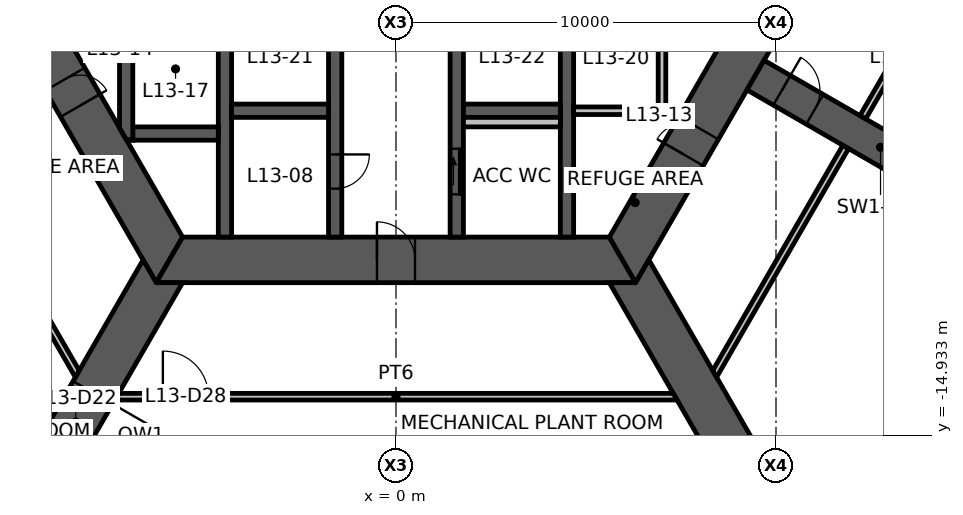
"""IFC4 building model, lengths in metres.
Left out: names, types, materials, properties, quantities, classifications, styles, units other than length and angle.
Written with IfcOpenShell. Run it as: python <this file> out.ifc"""

import sys

from ifc_helpers import new_model, si_unit, direction, frame, frame_2d, origin, place, context, subcontext, project, spatial, polyline, rectangle, outline, extrude, element, fill, save


model = new_model("IFC4")
c1 = context("Model", 3, precision=1e-05, world=origin(), true_north=direction((0.0, 1.0)))
c2 = subcontext(c1, "Body", "Model", "MODEL_VIEW")
j1 = project(units=[si_unit("LENGTHUNIT", "METRE"), si_unit("PLANEANGLEUNIT", "RADIAN")], contexts=[c1])
p1 = place(None, origin())
s1 = spatial("IfcSite", under=j1, at=p1, CompositionType="ELEMENT")
p2 = place(p1, origin())
s2 = spatial("IfcBuilding", under=s1, at=p2, CompositionType="ELEMENT")
p3 = place(p2, frame((0.0, 0.0, 52.0)))
s3 = spatial("IfcBuildingStorey", under=s2, at=p3, CompositionType="ELEMENT", Elevation=52.0)
p4 = place(p3, frame((-11.922, 0.0, 0.0), z_axis=(0.0, 0.0, 1.0), x_axis=(0.500004296715, -0.866022923061, 0.0)))
e1 = element("IfcWall", 1, at=p4, inside=s3, PredefinedType="SHEAR", context=c2, shape_type="SweptSolid", body=[
    extrude(outline(polyline([(-0.346, -0.6), (6.431, -0.6), (7.231, -0.6), (12.269, -0.6), (11.576, 0.6), (7.231, 0.6), (6.431, 0.6), (0.346, 0.6), (-0.346, -0.6)])), origin(), (0.0, 0.0, 1.0), 5.0),
])
p5 = place(p4, frame((6.431, 0.0, 0.0)))
e2 = element("IfcOpeningElement", 2, at=p5, cuts=e1, PredefinedType="OPENING", context=c2, shape_type="SweptSolid", body=[
    extrude(rectangle(XDim=0.8, YDim=2.1, at=frame_2d((0.4, 1.05))), frame((0.0, 0.61, 0.0), z_axis=(0.0, -1.0, 0.0), x_axis=(1.0, 0.0, 0.0)), (0.0, 0.0, 1.0), 1.22),
])
p6 = place(p3, frame((-5.961, -10.325, 0.0), z_axis=(0.0, 0.0, 1.0), x_axis=(1.0, 0.0, 0.0)))
e3 = element("IfcWall", 3, at=p6, inside=s3, PredefinedType="SHEAR", context=c2, shape_type="SweptSolid", body=[
    extrude(outline(polyline([(-0.346, -0.6), (5.461, -0.6), (6.461, -0.6), (12.269, -0.6), (11.576, 0.6), (6.461, 0.6), (5.461, 0.6), (0.346, 0.6), (-0.346, -0.6)])), origin(), (0.0, 0.0, 1.0), 5.0),
])
p7 = place(p6, frame((5.461, 0.0, 0.0)))
e4 = element("IfcOpeningElement", 4, at=p7, cuts=e3, PredefinedType="OPENING", context=c2, shape_type="SweptSolid", body=[
    extrude(rectangle(XDim=1.0, YDim=2.1, at=frame_2d((0.5, 1.05))), frame((0.0, 0.61, 0.0), z_axis=(0.0, -1.0, 0.0), x_axis=(1.0, 0.0, 0.0)), (0.0, 0.0, 1.0), 1.22),
])
p8 = place(p3, frame((5.961, -10.325, 0.0), z_axis=(0.0, 0.0, 1.0), x_axis=(0.500004296715, 0.866022923061, 0.0)))
e5 = element("IfcWall", 5, at=p8, inside=s3, PredefinedType="SHEAR", context=c2, shape_type="SweptSolid", body=[
    extrude(outline(polyline([(-0.346, -0.6), (3.208, -0.6), (4.009, -0.6), (12.269, -0.6), (11.576, 0.6), (4.009, 0.6), (3.208, 0.6), (0.346, 0.6), (-0.346, -0.6)])), origin(), (0.0, 0.0, 1.0), 5.0),
])
p9 = place(p8, frame((3.208, 0.0, 0.0)))
e6 = element("IfcOpeningElement", 6, at=p9, cuts=e5, PredefinedType="OPENING", context=c2, shape_type="SweptSolid", body=[
    extrude(rectangle(XDim=0.8, YDim=2.1, at=frame_2d((0.4, 1.05))), frame((0.0, 0.61, 0.0), z_axis=(0.0, -1.0, 0.0), x_axis=(1.0, 0.0, 0.0)), (0.0, 0.0, 1.0), 1.22),
])
p10 = place(p3, frame((9.461, -5.462, 0.0), z_axis=(0.0, 0.0, 1.0), x_axis=(0.866019116917, -0.500010889016, 0.0)))
e7 = element("IfcWall", 7, at=p10, inside=s3, PredefinedType="SHEAR", context=c2, shape_type="SweptSolid", body=[
    extrude(rectangle(XDim=7.595, YDim=0.9, at=frame_2d((3.798, 0.0))), origin(), (0.0, 0.0, 1.0), 5.0),
])
p11 = place(p10, frame((0.8, 0.0, 0.0)))
e8 = element("IfcOpeningElement", 8, at=p11, cuts=e7, PredefinedType="OPENING", context=c2, shape_type="SweptSolid", body=[
    extrude(rectangle(XDim=1.0, YDim=2.1, at=frame_2d((0.5, 1.05))), frame((0.0, 0.46, 0.0), z_axis=(0.0, -1.0, 0.0), x_axis=(1.0, 0.0, 0.0)), (0.0, 0.0, 1.0), 0.92),
])
p12 = place(p3, frame((-6.308, -10.925, -1.15), z_axis=(0.0, 0.0, 1.0), x_axis=(-0.499993363642, -0.866029235253, 0.0)))
e9 = element("IfcWall", 9, at=p12, inside=s3, PredefinedType="SHEAR", context=c2, shape_type="SweptSolid", body=[
    extrude(outline(polyline([(-0.346, -0.6), (3.338, -0.6), (5.138, -0.6), (7.385, -0.6), (7.385, 0.6), (5.138, 0.6), (3.338, 0.6), (-0.346, 0.6), (0.0, 0.0), (-0.346, -0.6)])), origin(), (0.0, 0.0, 1.0), 6.15),
])
p13 = place(p12, frame((3.338, 0.0, 1.15)))
e10 = element("IfcOpeningElement", 10, at=p13, cuts=e9, PredefinedType="OPENING", context=c2, shape_type="SweptSolid", body=[
    extrude(rectangle(XDim=1.8, YDim=2.4, at=frame_2d((0.9, 1.2))), frame((0.0, 0.61, 0.0), z_axis=(0.0, -1.0, 0.0), x_axis=(1.0, 0.0, 0.0)), (0.0, 0.0, 1.0), 1.22),
])
p14 = place(p3, frame((6.308, -10.925, -1.15), z_axis=(0.0, 0.0, 1.0), x_axis=(0.499993363642, -0.866029235253, 0.0)))
e11 = element("IfcWall", 11, at=p14, inside=s3, PredefinedType="SHEAR", context=c2, shape_type="SweptSolid", body=[
    extrude(outline(polyline([(-0.346, -0.6), (7.385, -0.6), (7.385, 0.6), (-0.346, 0.6), (0.0, 0.0), (-0.346, -0.6)])), origin(), (0.0, 0.0, 1.0), 6.15),
])
p15 = place(p3, frame((-1.6, -3.775, 0.0), z_axis=(0.0, 0.0, 1.0), x_axis=(0.0, -1.0, 0.0)))
e12 = element("IfcWall", 12, at=p15, inside=s3, PredefinedType="SHEAR", context=c2, shape_type="SweptSolid", body=[
    extrude(rectangle(XDim=5.95, YDim=0.35, at=frame_2d((2.975, 0.0))), origin(), (0.0, 0.0, 1.0), 5.0),
])
p16 = place(p15, frame((3.775, 0.0, 0.0)))
e13 = element("IfcOpeningElement", 13, at=p16, cuts=e12, PredefinedType="OPENING", context=c2, shape_type="SweptSolid", body=[
    extrude(rectangle(XDim=0.9, YDim=2.1, at=frame_2d((0.45, 1.05))), frame((0.0, 0.185, 0.0), z_axis=(0.0, -1.0, 0.0), x_axis=(1.0, 0.0, 0.0)), (0.0, 0.0, 1.0), 0.37),
])
p17 = place(p3, frame((1.6, -3.775, 0.0), z_axis=(0.0, 0.0, 1.0), x_axis=(0.0, -1.0, 0.0)))
e14 = element("IfcWall", 14, at=p17, inside=s3, PredefinedType="SHEAR", context=c2, shape_type="SweptSolid", body=[
    extrude(rectangle(XDim=5.95, YDim=0.35, at=frame_2d((2.975, 0.0))), origin(), (0.0, 0.0, 1.0), 5.0),
])
p18 = place(p17, frame((3.625, 0.0, 0.0)))
e15 = element("IfcOpeningElement", 15, at=p18, cuts=e14, PredefinedType="OPENING", context=c2, shape_type="SweptSolid", body=[
    extrude(rectangle(XDim=1.2, YDim=2.1, at=frame_2d((0.6, 1.05))), frame((0.0, 0.185, 0.0), z_axis=(0.0, -1.0, 0.0), x_axis=(1.0, 0.0, 0.0)), (0.0, 0.0, 1.0), 0.37),
])
for number, where, z_axis, x_axis in (
    (16, (-4.5, -3.775, 0.0), (0.0, 0.0, 1.0), (0.0, -1.0, 0.0)),
    (17, (4.5, -3.775, 0.0), (0.0, 0.0, 1.0), (0.0, -1.0, 0.0)),
):
    element("IfcWall", number, at=place(p3, frame(where, z_axis=z_axis, x_axis=x_axis)), inside=s3, PredefinedType="SHEAR", context=c2, shape_type="SweptSolid", body=[
        extrude(rectangle(XDim=5.95, YDim=0.35, at=frame_2d((2.975, 0.0))), origin(), (0.0, 0.0, 1.0), 5.0),
    ])
for number, where, z_axis, x_axis in (
    (18, (-4.325, -6.4, 0.0), (0.0, 0.0, 1.0), (1.0, 0.0, 0.0)),
    (19, (1.775, -6.4, 0.0), (0.0, 0.0, 1.0), (1.0, 0.0, 0.0)),
):
    element("IfcWall", number, at=place(p3, frame(where, z_axis=z_axis, x_axis=x_axis)), inside=s3, PredefinedType="SHEAR", context=c2, shape_type="SweptSolid", body=[
        extrude(rectangle(XDim=2.55, YDim=0.35, at=frame_2d((1.275, 0.0))), origin(), (0.0, 0.0, 1.0), 5.0),
    ])
p19 = place(p3, frame((-6.925, -7.0, 0.0), z_axis=(0.0, 0.0, 1.0), x_axis=(1.0, 0.0, 0.0)))
e20 = element("IfcWall", 20, at=p19, inside=s3, PredefinedType="SHEAR", context=c2, shape_type="SweptSolid", body=[
    extrude(rectangle(XDim=2.25, YDim=0.35, at=frame_2d((1.125, 0.0))), origin(), (0.0, 0.0, 1.0), 5.0),
])
p20 = place(p3, frame((-7.1, -3.775, 0.0), z_axis=(0.0, 0.0, 1.0), x_axis=(0.0, -1.0, 0.0)))
e21 = element("IfcWall", 21, at=p20, inside=s3, PredefinedType="SHEAR", context=c2, shape_type="SweptSolid", body=[
    extrude(outline(polyline([(0.0, -0.175), (3.074, -0.175), (3.377, 0.0), (3.4, 0.175), (0.0, 0.175), (0.0, -0.175)])), origin(), (0.0, 0.0, 1.0), 5.0),
])
p21 = place(p3, frame((4.675, -6.4, 0.0), z_axis=(0.0, 0.0, 1.0), x_axis=(1.0, 0.0, 0.0)))
e22 = element("IfcWall", 22, at=p21, inside=s3, PredefinedType="STANDARD", context=c2, shape_type="SweptSolid", body=[
    extrude(rectangle(XDim=2.425, YDim=0.2, at=frame_2d((1.212, 0.0))), origin(), (0.0, 0.0, 1.0), 5.0),
])
p22 = place(p3, frame((7.0, -3.775, 0.0), z_axis=(0.0, 0.0, 1.0), x_axis=(0.0, -1.0, 0.0)))
e23 = element("IfcWall", 23, at=p22, inside=s3, PredefinedType="STANDARD", context=c2, shape_type="SweptSolid", body=[
    extrude(rectangle(XDim=2.525, YDim=0.2, at=frame_2d((1.263, 0.0))), origin(), (0.0, 0.0, 1.0), 5.0),
])
p23 = place(p3, frame((1.775, -6.7, 0.0), z_axis=(0.0, 0.0, 1.0), x_axis=(1.0, 0.0, 0.0)))
e24 = element("IfcWall", 24, at=p23, inside=s3, PredefinedType="PLUMBINGWALL", context=c2, shape_type="SweptSolid", body=[
    extrude(rectangle(XDim=2.55, YDim=0.25, at=frame_2d((1.275, 0.0))), origin(), (0.0, 0.0, 1.0), 5.0),
])
p24 = place(p3, frame((-11.832, -7.356, 0.0), z_axis=(0.0, 0.0, 1.0), x_axis=(0.49998719302, -0.866032797772, 0.0)))
e25 = element("IfcWall", 25, at=p24, inside=s3, PredefinedType="PARTITIONING", context=c2, shape_type="SweptSolid", body=[
    extrude(outline(polyline([(0.0, -0.087), (1.9, -0.087), (3.1, -0.087), (6.942, -0.087), (6.841, 0.087), (3.1, 0.087), (1.9, 0.087), (0.0, 0.087), (0.0, -0.087)])), origin(), (0.0, 0.0, 1.0), 4.83),
])
p25 = place(p24, frame((1.9, 0.0, 0.0)))
e26 = element("IfcOpeningElement", 26, at=p25, cuts=e25, PredefinedType="OPENING", context=c2, shape_type="SweptSolid", body=[
    extrude(rectangle(XDim=1.2, YDim=2.1, at=frame_2d((0.6, 1.05))), frame((0.0, 0.098, 0.0), z_axis=(0.0, -1.0, 0.0), x_axis=(1.0, 0.0, 0.0)), (0.0, 0.0, 1.0), 0.195),
])
p26 = place(p3, frame((12.287, -6.569, 0.0), z_axis=(0.0, 0.0, 1.0), x_axis=(0.49998719302, 0.866032797772, 0.0)))
e27 = element("IfcWall", 27, at=p26, inside=s3, PredefinedType="PARTITIONING", context=c2, shape_type="SweptSolid", body=[
    extrude(outline(polyline([(0.0, -0.087), (1.9, -0.087), (3.1, -0.087), (6.942, -0.087), (6.841, 0.087), (3.1, 0.087), (1.9, 0.087), (0.0, 0.087), (0.0, -0.087)])), origin(), (0.0, 0.0, 1.0), 4.83),
])
p27 = place(p26, frame((1.9, 0.0, 0.0)))
e28 = element("IfcOpeningElement", 28, at=p27, cuts=e27, PredefinedType="OPENING", context=c2, shape_type="SweptSolid", body=[
    extrude(rectangle(XDim=1.2, YDim=2.1, at=frame_2d((0.6, 1.05))), frame((0.0, 0.098, 0.0), z_axis=(0.0, -1.0, 0.0), x_axis=(1.0, 0.0, 0.0)), (0.0, 0.0, 1.0), 0.195),
])
p28 = place(p3, frame((-7.347, -13.925, 0.0), z_axis=(0.0, 0.0, 1.0), x_axis=(1.0, 0.0, 0.0)))
e29 = element("IfcWall", 29, at=p28, inside=s3, PredefinedType="PARTITIONING", context=c2, shape_type="SweptSolid", body=[
    extrude(outline(polyline([(-0.051, -0.087), (1.213, -0.087), (2.413, -0.087), (14.744, -0.087), (14.643, 0.087), (2.413, 0.087), (1.213, 0.087), (0.051, 0.087), (-0.051, -0.087)])), origin(), (0.0, 0.0, 1.0), 4.83),
])
p29 = place(p28, frame((1.213, 0.0, 0.0)))
e30 = element("IfcOpeningElement", 30, at=p29, cuts=e29, PredefinedType="OPENING", context=c2, shape_type="SweptSolid", body=[
    extrude(rectangle(XDim=1.2, YDim=2.1, at=frame_2d((0.6, 1.05))), frame((0.0, 0.098, 0.0), z_axis=(0.0, -1.0, 0.0), x_axis=(1.0, 0.0, 0.0)), (0.0, 0.0, 1.0), 0.195),
])
p30 = place(p3, frame((8.386, -13.325, 0.0), z_axis=(0.0, 0.0, 1.0), x_axis=(0.49998719302, 0.866032797772, 0.0)))
e31 = element("IfcWall", 31, at=p30, inside=s3, PredefinedType="PARTITIONING", context=c2, shape_type="SweptSolid", body=[
    extrude(outline(polyline([(-0.051, -0.087), (6.892, -0.087), (6.892, 0.087), (0.051, 0.087), (-0.051, -0.087)])), origin(), (0.0, 0.0, 1.0), 4.83),
])
p31 = place(p7, origin())
e32 = element("IfcDoor", 32, at=p31, inside=s3, OperationType="SINGLE_SWING_LEFT", PredefinedType="DOOR", context=c2, shape_type="SweptSolid", body=[
    extrude(rectangle(XDim=1.0, YDim=2.1, at=frame_2d((0.5, 1.05))), frame((0.0, 0.025, 0.0), z_axis=(0.0, -1.0, 0.0), x_axis=(1.0, 0.0, 0.0)), (0.0, 0.0, 1.0), 0.05),
])
fill(e4, e32)
p32 = place(p9, origin())
e33 = element("IfcDoor", 33, at=p32, inside=s3, OperationType="SINGLE_SWING_LEFT", PredefinedType="DOOR", context=c2, shape_type="SweptSolid", body=[
    extrude(rectangle(XDim=0.8, YDim=2.1, at=frame_2d((0.4, 1.05))), frame((0.0, 0.025, 0.0), z_axis=(0.0, -1.0, 0.0), x_axis=(1.0, 0.0, 0.0)), (0.0, 0.0, 1.0), 0.05),
])
fill(e6, e33)
p33 = place(p5, origin())
e34 = element("IfcDoor", 34, at=p33, inside=s3, OperationType="SINGLE_SWING_RIGHT", PredefinedType="DOOR", context=c2, shape_type="SweptSolid", body=[
    extrude(rectangle(XDim=0.8, YDim=2.1, at=frame_2d((0.4, 1.05))), frame((0.0, 0.025, 0.0), z_axis=(0.0, -1.0, 0.0), x_axis=(1.0, 0.0, 0.0)), (0.0, 0.0, 1.0), 0.05),
])
fill(e2, e34)
p34 = place(p18, origin())
e35 = element("IfcDoor", 35, at=p34, inside=s3, OperationType="SLIDING_TO_LEFT", PredefinedType="DOOR", context=c2, shape_type="SweptSolid", body=[
    extrude(rectangle(XDim=1.2, YDim=2.1, at=frame_2d((0.6, 1.05))), frame((0.0, 0.025, 0.0), z_axis=(0.0, -1.0, 0.0), x_axis=(1.0, 0.0, 0.0)), (0.0, 0.0, 1.0), 0.05),
])
fill(e15, e35)
p35 = place(p16, origin())
e36 = element("IfcDoor", 36, at=p35, inside=s3, OperationType="SINGLE_SWING_LEFT", PredefinedType="DOOR", context=c2, shape_type="SweptSolid", body=[
    extrude(rectangle(XDim=0.9, YDim=2.1, at=frame_2d((0.45, 1.05))), frame((0.0, 0.025, 0.0), z_axis=(0.0, -1.0, 0.0), x_axis=(1.0, 0.0, 0.0)), (0.0, 0.0, 1.0), 0.05),
])
fill(e13, e36)
p36 = place(p11, origin())
e37 = element("IfcDoor", 37, at=p36, inside=s3, OperationType="SINGLE_SWING_LEFT", PredefinedType="DOOR", context=c2, shape_type="SweptSolid", body=[
    extrude(rectangle(XDim=1.0, YDim=2.1, at=frame_2d((0.5, 1.05))), frame((0.0, 0.025, 0.0), z_axis=(0.0, -1.0, 0.0), x_axis=(1.0, 0.0, 0.0)), (0.0, 0.0, 1.0), 0.05),
])
fill(e8, e37)
p37 = place(p13, origin())
e38 = element("IfcDoor", 38, at=p37, inside=s3, OperationType="DOUBLE_DOOR_SINGLE_SWING", PredefinedType="DOOR", context=c2, shape_type="SweptSolid", body=[
    extrude(rectangle(XDim=1.8, YDim=2.4, at=frame_2d((0.9, 1.2))), frame((0.0, 0.025, 0.0), z_axis=(0.0, -1.0, 0.0), x_axis=(1.0, 0.0, 0.0)), (0.0, 0.0, 1.0), 0.05),
])
fill(e10, e38)
p38 = place(p29, origin())
e39 = element("IfcDoor", 39, at=p38, inside=s3, OperationType="DOUBLE_DOOR_SINGLE_SWING", PredefinedType="DOOR", context=c2, shape_type="SweptSolid", body=[
    extrude(rectangle(XDim=1.2, YDim=2.1, at=frame_2d((0.6, 1.05))), frame((0.0, 0.025, 0.0), z_axis=(0.0, -1.0, 0.0), x_axis=(1.0, 0.0, 0.0)), (0.0, 0.0, 1.0), 0.05),
])
fill(e30, e39)
save(model, sys.argv[1])
